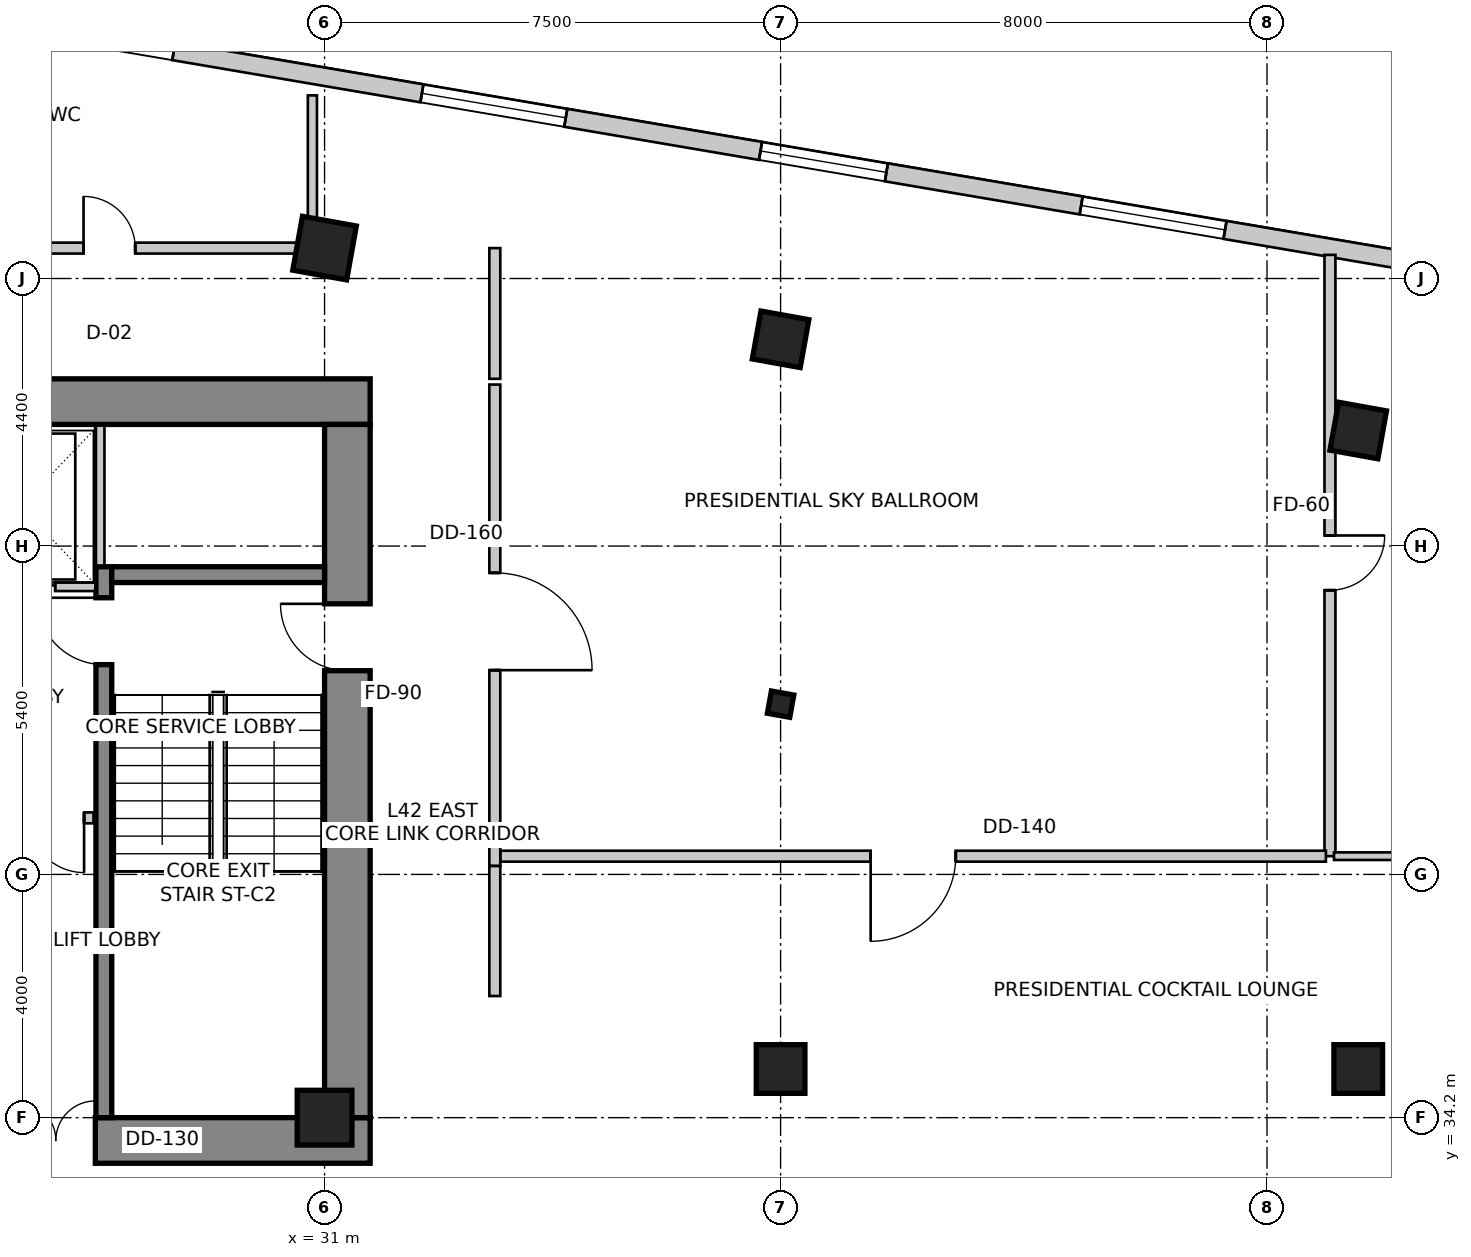
"""IFC4 building model, lengths in metres.
Left out: names, types, materials, properties, quantities, classifications, styles, units other than length and angle.
Written with IfcOpenShell. Run it as: python <this file> out.ifc"""

import sys

from ifc_helpers import new_model, si_unit, direction, frame, frame_2d, origin, origin_2d, place, context, subcontext, project, spatial, rectangle, i_section, extrude, source, transform, mapped, element, fill, save


model = new_model("IFC4")
c1 = context("Model", 3, precision=1e-05, world=origin(), true_north=direction((0.0, 1.0)))
c2 = subcontext(c1, "Body", "Model", "MODEL_VIEW")
j1 = project(units=[si_unit("LENGTHUNIT", "METRE"), si_unit("PLANEANGLEUNIT", "RADIAN")], contexts=[c1])
p1 = place(None, origin())
s1 = spatial("IfcSite", under=j1, at=p1, CompositionType="ELEMENT")
p2 = place(p1, origin())
s2 = spatial("IfcBuilding", under=s1, at=p2, CompositionType="ELEMENT")
p3 = place(p2, frame((0.0, 0.0, 168.2)))
s3 = spatial("IfcBuildingStorey", under=s2, at=p3, CompositionType="ELEMENT", Elevation=168.2)
p4 = place(p3, frame((15.85, 45.975, 0.0), z_axis=(0.0, 0.0, 1.0), x_axis=(1.0, 0.0, 0.0)))
e1 = element("IfcWall", 1, at=p4, inside=s3, PredefinedType="SHEAR", context=c2, shape_type="SweptSolid", body=[
    extrude(rectangle(XDim=15.9, YDim=0.75, at=frame_2d((7.95, 0.0))), origin(), (0.0, 0.0, 1.0), 3.6),
])
p5 = place(p3, frame((15.85, 33.825, 0.0), z_axis=(0.0, 0.0, 1.0), x_axis=(1.0, 0.0, 0.0)))
e2 = element("IfcWall", 2, at=p5, inside=s3, PredefinedType="SHEAR", context=c2, shape_type="SweptSolid", body=[
    extrude(rectangle(XDim=15.9, YDim=0.75, at=frame_2d((7.95, 0.0))), origin(), (0.0, 0.0, 1.0), 3.6),
])
m1 = source(origin(), c2, "Body", "SweptSolid", [
    extrude(rectangle(XDim=1.3, YDim=2.15, at=frame_2d((0.65, 1.075))), frame((0.0, 0.385, 0.0), z_axis=(0.0, -1.0, 0.0), x_axis=(1.0, 0.0, 0.0)), (0.0, 0.0, 1.0), 0.77),
])
p6 = place(p5, frame((10.08, 0.0, 0.0)))
e3 = element("IfcOpeningElement", 3, at=p6, cuts=e2, PredefinedType="OPENING", context=c2, shape_type="MappedRepresentation", body=[
    mapped(m1, transform((0.0, 0.0, 0.0), scale=1.0)),
])
p7 = place(p3, frame((31.375, 34.2, 0.0), z_axis=(0.0, 0.0, 1.0), x_axis=(0.0, 1.0, 0.0)))
e4 = element("IfcWall", 4, at=p7, inside=s3, PredefinedType="SHEAR", context=c2, shape_type="SweptSolid", body=[
    extrude(rectangle(XDim=11.4, YDim=0.75, at=frame_2d((5.7, 0.0))), origin(), (0.0, 0.0, 1.0), 3.6),
])
m2 = source(origin(), c2, "Body", "SweptSolid", [
    extrude(rectangle(XDim=1.1, YDim=2.15, at=frame_2d((0.55, 1.075))), frame((0.0, 0.385, 0.0), z_axis=(0.0, -1.0, 0.0), x_axis=(1.0, 0.0, 0.0)), (0.0, 0.0, 1.0), 0.77),
])
p8 = place(p7, frame((7.35, 0.0, 0.0)))
e5 = element("IfcOpeningElement", 5, at=p8, cuts=e4, PredefinedType="OPENING", context=c2, shape_type="MappedRepresentation", body=[
    mapped(m2, transform((0.0, 0.0, 0.0), scale=1.0)),
])
p9 = place(p3, frame((27.37, 34.2, 0.0), z_axis=(0.0, 0.0, 1.0), x_axis=(0.0, 1.0, 0.0)))
e6 = element("IfcWall", 6, at=p9, inside=s3, PredefinedType="SHEAR", context=c2, shape_type="SweptSolid", body=[
    extrude(rectangle(XDim=9.06, YDim=0.26, at=frame_2d((4.53, 0.0))), origin(), (0.0, 0.0, 1.0), 3.6),
])
m3 = source(origin(), c2, "Body", "SweptSolid", [
    extrude(rectangle(XDim=1.1, YDim=2.15, at=frame_2d((0.55, 1.075))), frame((0.0, 0.14, 0.0), z_axis=(0.0, -1.0, 0.0), x_axis=(1.0, 0.0, 0.0)), (0.0, 0.0, 1.0), 0.28),
])
p10 = place(p9, frame((7.45, 0.0, 0.0)))
e7 = element("IfcOpeningElement", 7, at=p10, cuts=e6, PredefinedType="OPENING", context=c2, shape_type="MappedRepresentation", body=[
    mapped(m3, transform((0.0, 0.0, 0.0), scale=1.0)),
])
p11 = place(p3, frame((27.5, 43.13, 0.0), z_axis=(0.0, 0.0, 1.0), x_axis=(1.0, 0.0, 0.0)))
e8 = element("IfcWall", 8, at=p11, inside=s3, PredefinedType="SHEAR", context=c2, shape_type="SweptSolid", body=[
    extrude(rectangle(XDim=3.5, YDim=0.26, at=frame_2d((1.75, 0.0))), origin(), (0.0, 0.0, 1.0), 3.6),
])
m4 = source(origin(), c2, "Body", "SweptSolid", [
    extrude(rectangle(XDim=0.9, YDim=0.9, at=origin_2d()), origin(), (0.0, 0.0, 1.0), 3.6),
])
p12 = place(p3, frame((31.0, 48.5, 0.0), z_axis=(0.0, 0.0, 1.0), x_axis=(0.984195607969, -0.17708474032, 0.0)))
e9 = element("IfcColumn", 9, at=p12, inside=s3, PredefinedType="COLUMN", context=c2, shape_type="MappedRepresentation", body=[
    mapped(m4, transform((0.0, 0.0, 0.0), scale=1.0)),
])
m5 = source(origin(), c2, "Body", "SweptSolid", [
    extrude(rectangle(XDim=0.8, YDim=0.8, at=origin_2d()), origin(), (0.0, 0.0, 1.0), 3.6),
])
for number, where, z_axis, x_axis in (
    (10, (38.5, 47.0, 0.0), (0.0, 0.0, 1.0), (0.984, -0.177, 0.0)),
    (11, (48.0, 45.5, 0.0), (0.0, 0.0, 1.0), (0.984, -0.177, 0.0)),
):
    element("IfcColumn", number, at=place(p3, frame(where, z_axis=z_axis, x_axis=x_axis)), inside=s3, PredefinedType="COLUMN", context=c2, shape_type="MappedRepresentation", body=[
        mapped(m5, transform((0.0, 0.0, 0.0), scale=1.0)),
    ])
p13 = place(p3, frame((31.0, 34.2, 0.0), z_axis=(0.0, 0.0, 1.0), x_axis=(1.0, 0.0, 0.0)))
e12 = element("IfcColumn", 12, at=p13, inside=s3, PredefinedType="COLUMN", context=c2, shape_type="MappedRepresentation", body=[
    mapped(m4, transform((0.0, 0.0, 0.0), scale=1.0)),
])
for number, where, z_axis, x_axis in (
    (13, (38.5, 35.0, 0.0), (0.0, 0.0, 1.0), (1.0, 0.0, 0.0)),
    (14, (48.0, 35.0, 0.0), (0.0, 0.0, 1.0), (1.0, 0.0, 0.0)),
):
    element("IfcColumn", number, at=place(p3, frame(where, z_axis=z_axis, x_axis=x_axis)), inside=s3, PredefinedType="COLUMN", context=c2, shape_type="MappedRepresentation", body=[
        mapped(m5, transform((0.0, 0.0, 0.0), scale=1.0)),
    ])
m6 = source(origin(), c2, "Body", "SweptSolid", [
    extrude(i_section(OverallWidth=0.374, OverallDepth=0.372, WebThickness=0.016, FlangeThickness=0.026, FilletRadius=0.015, at=origin_2d()), origin(), (0.0, 0.0, 1.0), 3.6),
])
p14 = place(p3, frame((38.5, 41.0, 0.0), z_axis=(0.0, 0.0, 1.0), x_axis=(0.984195607969, -0.17708474032, 0.0)))
e15 = element("IfcColumn", 15, at=p14, inside=s3, PredefinedType="COLUMN", context=c2, shape_type="MappedRepresentation", body=[
    mapped(m6, transform((0.0, 0.0, 0.0), scale=1.0)),
])
p15 = place(p3, frame((53.561, 47.48, 0.0), z_axis=(0.0, 0.0, 1.0), x_axis=(-0.985845173895, 0.167658262868, 0.0)))
e16 = element("IfcWall", 16, at=p15, inside=s3, PredefinedType="SOLIDWALL", context=c2, shape_type="SweptSolid", body=[
    extrude(rectangle(XDim=32.132, YDim=0.3, at=frame_2d((16.066, 0.0))), origin(), (0.0, 0.0, 1.0), 3.3),
])
m7 = source(origin(), c2, "Body", "SweptSolid", [
    extrude(rectangle(XDim=2.4, YDim=2.2, at=frame_2d((1.2, 1.1))), frame((0.0, 0.16, 0.0), z_axis=(0.0, -1.0, 0.0), x_axis=(1.0, 0.0, 0.0)), (0.0, 0.0, 1.0), 0.32),
])
p16 = place(p15, frame((1.896, 0.0, 0.85)))
e17 = element("IfcOpeningElement", 17, at=p16, cuts=e16, PredefinedType="OPENING", context=c2, shape_type="MappedRepresentation", body=[
    mapped(m7, transform((0.0, 0.0, 0.0), scale=1.0)),
])
p17 = place(p15, frame((7.863, 0.0, 0.85)))
e18 = element("IfcOpeningElement", 18, at=p17, cuts=e16, PredefinedType="OPENING", context=c2, shape_type="MappedRepresentation", body=[
    mapped(m7, transform((0.0, 0.0, 0.0), scale=1.0)),
])
m8 = source(origin(), c2, "Body", "SweptSolid", [
    extrude(rectangle(XDim=2.1, YDim=2.0, at=frame_2d((1.05, 1.0))), frame((0.0, 0.16, 0.0), z_axis=(0.0, -1.0, 0.0), x_axis=(1.0, 0.0, 0.0)), (0.0, 0.0, 1.0), 0.32),
])
p18 = place(p15, frame((13.512, 0.0, 0.85)))
e19 = element("IfcOpeningElement", 19, at=p18, cuts=e16, PredefinedType="OPENING", context=c2, shape_type="MappedRepresentation", body=[
    mapped(m8, transform((0.0, 0.0, 0.0), scale=1.0)),
])
p19 = place(p15, frame((18.861, 0.0, 0.85)))
e20 = element("IfcOpeningElement", 20, at=p19, cuts=e16, PredefinedType="OPENING", context=c2, shape_type="MappedRepresentation", body=[
    mapped(m7, transform((0.0, 0.0, 0.0), scale=1.0)),
])
p20 = place(p15, frame((25.4, 0.0, 0.85)))
e21 = element("IfcOpeningElement", 21, at=p20, cuts=e16, PredefinedType="OPENING", context=c2, shape_type="MappedRepresentation", body=[
    mapped(m7, transform((0.0, 0.0, 0.0), scale=1.0)),
])
m9 = source(origin(), c2, "Body", "SweptSolid", [
    extrude(rectangle(XDim=1.2, YDim=1.6, at=frame_2d((0.6, 0.8))), frame((0.0, 0.16, 0.0), z_axis=(0.0, -1.0, 0.0), x_axis=(1.0, 0.0, 0.0)), (0.0, 0.0, 1.0), 0.32),
])
p21 = place(p15, frame((30.5, 0.0, 0.85)))
e22 = element("IfcOpeningElement", 22, at=p21, cuts=e16, PredefinedType="OPENING", context=c2, shape_type="MappedRepresentation", body=[
    mapped(m9, transform((0.0, 0.0, 0.0), scale=1.0)),
])
p22 = place(p3, frame((20.37, 42.93, 0.0), z_axis=(0.0, 0.0, 1.0), x_axis=(1.0, 0.0, 0.0)))
e23 = element("IfcWall", 23, at=p22, inside=s3, PredefinedType="SOLIDWALL", context=c2, shape_type="SweptSolid", body=[
    extrude(rectangle(XDim=6.86, YDim=0.14, at=frame_2d((3.43, 0.0))), origin(), (0.0, 0.0, 1.0), 3.3),
])
m10 = source(origin(), c2, "Body", "SweptSolid", [
    extrude(rectangle(XDim=1.1, YDim=2.15, at=frame_2d((0.55, 1.075))), frame((0.0, 0.08, 0.0), z_axis=(0.0, -1.0, 0.0), x_axis=(1.0, 0.0, 0.0)), (0.0, 0.0, 1.0), 0.16),
])
p23 = place(p22, frame((0.5, 0.0, 0.0)))
e24 = element("IfcOpeningElement", 24, at=p23, cuts=e23, PredefinedType="OPENING", context=c2, shape_type="MappedRepresentation", body=[
    mapped(m10, transform((0.0, 0.0, 0.0), scale=1.0)),
])
p24 = place(p22, frame((2.7, 0.0, 0.0)))
e25 = element("IfcOpeningElement", 25, at=p24, cuts=e23, PredefinedType="OPENING", context=c2, shape_type="MappedRepresentation", body=[
    mapped(m10, transform((0.0, 0.0, 0.0), scale=1.0)),
])
p25 = place(p22, frame((5.1, 0.0, 0.0)))
e26 = element("IfcOpeningElement", 26, at=p25, cuts=e23, PredefinedType="OPENING", context=c2, shape_type="MappedRepresentation", body=[
    mapped(m10, transform((0.0, 0.0, 0.0), scale=1.0)),
])
p26 = place(p3, frame((27.31, 43.28, 0.0), z_axis=(0.0, 0.0, 1.0), x_axis=(0.0, 1.0, 0.0)))
e27 = element("IfcWall", 27, at=p26, inside=s3, PredefinedType="SOLIDWALL", context=c2, shape_type="SweptSolid", body=[
    extrude(rectangle(XDim=2.3, YDim=0.14, at=frame_2d((1.15, 0.0))), origin(), (0.0, 0.0, 1.0), 3.3),
])
p27 = place(p3, frame((27.2, 39.13, 0.0), z_axis=(0.0, 0.0, 1.0), x_axis=(-1.0, 0.0, 0.0)))
e28 = element("IfcWall", 28, at=p27, inside=s3, PredefinedType="PARTITIONING", context=c2, shape_type="SweptSolid", body=[
    extrude(rectangle(XDim=1.21, YDim=0.18, at=frame_2d((0.605, 0.0))), origin(), (0.0, 0.0, 1.0), 3.3),
])
m11 = source(origin(), c2, "Body", "SweptSolid", [
    extrude(rectangle(XDim=0.9, YDim=2.15, at=frame_2d((0.45, 1.075))), frame((0.0, 0.1, 0.0), z_axis=(0.0, -1.0, 0.0), x_axis=(1.0, 0.0, 0.0)), (0.0, 0.0, 1.0), 0.2),
])
p28 = place(p27, frame((0.155, 0.0, 0.0)))
e29 = element("IfcOpeningElement", 29, at=p28, cuts=e28, PredefinedType="OPENING", context=c2, shape_type="MappedRepresentation", body=[
    mapped(m11, transform((0.0, 0.0, 0.0), scale=1.0)),
])
p29 = place(p3, frame((23.962, 48.5, 0.0), z_axis=(0.0, 0.0, 1.0), x_axis=(1.0, 0.0, 0.0)))
e30 = element("IfcWall", 30, at=p29, inside=s3, PredefinedType="PARTITIONING", context=c2, shape_type="SweptSolid", body=[
    extrude(rectangle(XDim=6.998, YDim=0.18, at=frame_2d((3.499, 0.0))), origin(), (0.0, 0.0, 1.0), 2.442),
])
m12 = source(origin(), c2, "Body", "SweptSolid", [
    extrude(rectangle(XDim=0.85, YDim=2.15, at=frame_2d((0.425, 1.075))), frame((0.0, 0.1, 0.0), z_axis=(0.0, -1.0, 0.0), x_axis=(1.0, 0.0, 0.0)), (0.0, 0.0, 1.0), 0.2),
])
p30 = place(p29, frame((3.074, 0.0, 0.0)))
e31 = element("IfcOpeningElement", 31, at=p30, cuts=e30, PredefinedType="OPENING", context=c2, shape_type="MappedRepresentation", body=[
    mapped(m12, transform((0.0, 0.0, 0.0), scale=1.0)),
])
p31 = place(p3, frame((33.8, 48.5, 0.0), z_axis=(0.0, 0.0, 1.0), x_axis=(0.0, -1.0, 0.0)))
e32 = element("IfcWall", 32, at=p31, inside=s3, PredefinedType="PARTITIONING", context=c2, shape_type="SweptSolid", body=[
    extrude(rectangle(XDim=2.15, YDim=0.18, at=frame_2d((1.075, 0.0))), origin(), (0.0, 0.0, 1.0), 2.442),
])
p32 = place(p3, frame((33.8, 46.256, 0.0), z_axis=(0.0, 0.0, 1.0), x_axis=(0.0, -1.0, 0.0)))
e33 = element("IfcWall", 33, at=p32, inside=s3, PredefinedType="PARTITIONING", context=c2, shape_type="SweptSolid", body=[
    extrude(rectangle(XDim=7.916, YDim=0.18, at=frame_2d((3.958, 0.0))), origin(), (0.0, 0.0, 1.0), 2.738),
])
m13 = source(origin(), c2, "Body", "SweptSolid", [
    extrude(rectangle(XDim=1.6, YDim=2.15, at=frame_2d((0.8, 1.075))), frame((0.0, 0.1, 0.0), z_axis=(0.0, -1.0, 0.0), x_axis=(1.0, 0.0, 0.0)), (0.0, 0.0, 1.0), 0.2),
])
p33 = place(p32, frame((3.097, 0.0, 0.0)))
e34 = element("IfcOpeningElement", 34, at=p33, cuts=e33, PredefinedType="OPENING", context=c2, shape_type="MappedRepresentation", body=[
    mapped(m13, transform((0.0, 0.0, 0.0), scale=1.0)),
])
p34 = place(p3, frame((33.8, 38.338, 0.0), z_axis=(0.0, 0.0, 1.0), x_axis=(0.0, -1.0, 0.0)))
e35 = element("IfcWall", 35, at=p34, inside=s3, PredefinedType="PARTITIONING", context=c2, shape_type="SweptSolid", body=[
    extrude(rectangle(XDim=2.138, YDim=0.18, at=frame_2d((1.069, 0.0))), origin(), (0.0, 0.0, 1.0), 3.3),
])
p35 = place(p3, frame((47.535, 48.389, 0.0), z_axis=(0.0, 0.0, 1.0), x_axis=(0.0, -1.0, 0.0)))
e36 = element("IfcWall", 36, at=p35, inside=s3, PredefinedType="PARTITIONING", context=c2, shape_type="SweptSolid", body=[
    extrude(rectangle(XDim=9.889, YDim=0.18, at=frame_2d((4.944, 0.0))), origin(), (0.0, 0.0, 1.0), 2.442),
])
p36 = place(p35, frame((4.615, 0.0, 0.0)))
e37 = element("IfcOpeningElement", 37, at=p36, cuts=e36, PredefinedType="OPENING", context=c2, shape_type="MappedRepresentation", body=[
    mapped(m11, transform((0.0, 0.0, 0.0), scale=1.0)),
])
p37 = place(p3, frame((47.469, 38.5, 0.0), z_axis=(0.0, 0.0, 1.0), x_axis=(-1.0, 0.0, 0.0)))
e38 = element("IfcWall", 38, at=p37, inside=s3, PredefinedType="PARTITIONING", context=c2, shape_type="SweptSolid", body=[
    extrude(rectangle(XDim=13.574, YDim=0.18, at=frame_2d((6.787, 0.0))), origin(), (0.0, 0.0, 1.0), 2.738),
])
m14 = source(origin(), c2, "Body", "SweptSolid", [
    extrude(rectangle(XDim=1.4, YDim=2.15, at=frame_2d((0.7, 1.075))), frame((0.0, 0.1, 0.0), z_axis=(0.0, -1.0, 0.0), x_axis=(1.0, 0.0, 0.0)), (0.0, 0.0, 1.0), 0.2),
])
p38 = place(p37, frame((6.087, 0.0, 0.0)))
e39 = element("IfcOpeningElement", 39, at=p38, cuts=e38, PredefinedType="OPENING", context=c2, shape_type="MappedRepresentation", body=[
    mapped(m14, transform((0.0, 0.0, 0.0), scale=1.0)),
])
p39 = place(p3, frame((55.535, 38.5, 0.0), z_axis=(0.0, 0.0, 1.0), x_axis=(-1.0, 0.0, 0.0)))
e40 = element("IfcWall", 40, at=p39, inside=s3, PredefinedType="PARTITIONING", context=c2, shape_type="SweptSolid", body=[
    extrude(rectangle(XDim=7.933, YDim=0.125, at=frame_2d((3.967, 0.0))), origin(), (0.0, 0.0, 1.0), 2.753),
])
p40 = place(p3, frame((30.8, 51.011, 0.0), z_axis=(0.0, 0.0, 1.0), x_axis=(0.0, -1.0, 0.0)))
e41 = element("IfcWall", 41, at=p40, inside=s3, PredefinedType="PARTITIONING", context=c2, shape_type="SweptSolid", body=[
    extrude(rectangle(XDim=2.292, YDim=0.15, at=frame_2d((1.146, 0.0))), origin(), (0.0, 0.0, 1.0), 3.3),
])
m15 = source(origin(), c2, "Body", "SweptSolid", [
    extrude(rectangle(XDim=2.4, YDim=2.2, at=frame_2d((1.2, 1.1))), frame((0.0, -0.015, 0.0), z_axis=(0.0, -1.0, 0.0), x_axis=(1.0, 0.0, 0.0)), (0.0, 0.0, 1.0), 0.06),
])
p41 = place(p17, origin())
e42 = element("IfcWindow", 42, at=p41, inside=s3, PartitioningType="SINGLE_PANEL", PredefinedType="WINDOW", context=c2, shape_type="MappedRepresentation", body=[
    mapped(m15, transform((0.0, 0.0, 0.0), scale=1.0)),
])
fill(e18, e42)
m16 = source(origin(), c2, "Body", "SweptSolid", [
    extrude(rectangle(XDim=2.1, YDim=2.0, at=frame_2d((1.05, 1.0))), frame((0.0, -0.015, 0.0), z_axis=(0.0, -1.0, 0.0), x_axis=(1.0, 0.0, 0.0)), (0.0, 0.0, 1.0), 0.06),
])
p42 = place(p18, origin())
e43 = element("IfcWindow", 43, at=p42, inside=s3, PartitioningType="SINGLE_PANEL", PredefinedType="WINDOW", context=c2, shape_type="MappedRepresentation", body=[
    mapped(m16, transform((0.0, 0.0, 0.0), scale=1.0)),
])
fill(e19, e43)
p43 = place(p19, origin())
e44 = element("IfcWindow", 44, at=p43, inside=s3, PartitioningType="SINGLE_PANEL", PredefinedType="WINDOW", context=c2, shape_type="MappedRepresentation", body=[
    mapped(m15, transform((0.0, 0.0, 0.0), scale=1.0)),
])
fill(e20, e44)
m17 = source(origin(), c2, "Body", "SweptSolid", [
    extrude(rectangle(XDim=1.1, YDim=2.15, at=frame_2d((0.55, 1.075))), frame((0.0, 0.025, 0.0), z_axis=(0.0, -1.0, 0.0), x_axis=(1.0, 0.0, 0.0)), (0.0, 0.0, 1.0), 0.05),
])
p44 = place(p25, origin())
e45 = element("IfcDoor", 45, at=p44, inside=s3, OperationType="SLIDING_TO_LEFT", PredefinedType="DOOR", context=c2, shape_type="MappedRepresentation", body=[
    mapped(m17, transform((0.0, 0.0, 0.0), scale=1.0)),
])
fill(e26, e45)
m18 = source(origin(), c2, "Body", "SweptSolid", [
    extrude(rectangle(XDim=1.1, YDim=2.15, at=frame_2d((0.55, 1.075))), frame((0.0, 0.025, 0.0), z_axis=(0.0, -1.0, 0.0), x_axis=(1.0, 0.0, 0.0)), (0.0, 0.0, 1.0), 0.05),
])
p45 = place(p10, origin())
e46 = element("IfcDoor", 46, at=p45, inside=s3, OperationType="SINGLE_SWING_RIGHT", PredefinedType="DOOR", context=c2, shape_type="MappedRepresentation", body=[
    mapped(m18, transform((0.0, 0.0, 0.0), scale=1.0)),
])
fill(e7, e46)
p46 = place(p8, origin())
e47 = element("IfcDoor", 47, at=p46, inside=s3, OperationType="SINGLE_SWING_RIGHT", PredefinedType="DOOR", context=c2, shape_type="MappedRepresentation", body=[
    mapped(m18, transform((0.0, 0.0, 0.0), scale=1.0)),
])
fill(e5, e47)
m19 = source(origin(), c2, "Body", "SweptSolid", [
    extrude(rectangle(XDim=1.3, YDim=2.15, at=frame_2d((0.65, 1.075))), frame((0.0, 0.025, 0.0), z_axis=(0.0, -1.0, 0.0), x_axis=(1.0, 0.0, 0.0)), (0.0, 0.0, 1.0), 0.05),
])
p47 = place(p6, origin())
e48 = element("IfcDoor", 48, at=p47, inside=s3, OperationType="DOUBLE_DOOR_SINGLE_SWING", PredefinedType="DOOR", context=c2, shape_type="MappedRepresentation", body=[
    mapped(m19, transform((0.0, 0.0, 0.0), scale=1.0)),
])
fill(e3, e48)
m20 = source(origin(), c2, "Body", "SweptSolid", [
    extrude(rectangle(XDim=0.9, YDim=2.15, at=frame_2d((0.45, 1.075))), frame((0.0, 0.025, 0.0), z_axis=(0.0, -1.0, 0.0), x_axis=(1.0, 0.0, 0.0)), (0.0, 0.0, 1.0), 0.05),
])
p48 = place(p28, origin())
e49 = element("IfcDoor", 49, at=p48, inside=s3, OperationType="SINGLE_SWING_LEFT", PredefinedType="DOOR", context=c2, shape_type="MappedRepresentation", body=[
    mapped(m20, transform((0.0, 0.0, 0.0), scale=1.0)),
])
fill(e29, e49)
m21 = source(origin(), c2, "Body", "SweptSolid", [
    extrude(rectangle(XDim=0.85, YDim=2.15, at=frame_2d((0.425, 1.075))), frame((0.0, 0.025, 0.0), z_axis=(0.0, -1.0, 0.0), x_axis=(1.0, 0.0, 0.0)), (0.0, 0.0, 1.0), 0.05),
])
p49 = place(p30, origin())
e50 = element("IfcDoor", 50, at=p49, inside=s3, OperationType="SINGLE_SWING_LEFT", PredefinedType="DOOR", context=c2, shape_type="MappedRepresentation", body=[
    mapped(m21, transform((0.0, 0.0, 0.0), scale=1.0)),
])
fill(e31, e50)
m22 = source(origin(), c2, "Body", "SweptSolid", [
    extrude(rectangle(XDim=1.6, YDim=2.15, at=frame_2d((0.8, 1.075))), frame((0.0, 0.025, 0.0), z_axis=(0.0, -1.0, 0.0), x_axis=(1.0, 0.0, 0.0)), (0.0, 0.0, 1.0), 0.05),
])
p50 = place(p33, origin())
e51 = element("IfcDoor", 51, at=p50, inside=s3, OperationType="SINGLE_SWING_RIGHT", PredefinedType="DOOR", context=c2, shape_type="MappedRepresentation", body=[
    mapped(m22, transform((0.0, 0.0, 0.0), scale=1.0)),
])
fill(e34, e51)
p51 = place(p36, origin())
e52 = element("IfcDoor", 52, at=p51, inside=s3, OperationType="SINGLE_SWING_LEFT", PredefinedType="DOOR", context=c2, shape_type="MappedRepresentation", body=[
    mapped(m20, transform((0.0, 0.0, 0.0), scale=1.0)),
])
fill(e37, e52)
m23 = source(origin(), c2, "Body", "SweptSolid", [
    extrude(rectangle(XDim=1.4, YDim=2.15, at=frame_2d((0.7, 1.075))), frame((0.0, 0.025, 0.0), z_axis=(0.0, -1.0, 0.0), x_axis=(1.0, 0.0, 0.0)), (0.0, 0.0, 1.0), 0.05),
])
p52 = place(p38, origin())
e53 = element("IfcDoor", 53, at=p52, inside=s3, OperationType="SINGLE_SWING_RIGHT", PredefinedType="DOOR", context=c2, shape_type="MappedRepresentation", body=[
    mapped(m23, transform((0.0, 0.0, 0.0), scale=1.0)),
])
fill(e39, e53)
save(model, sys.argv[1])
